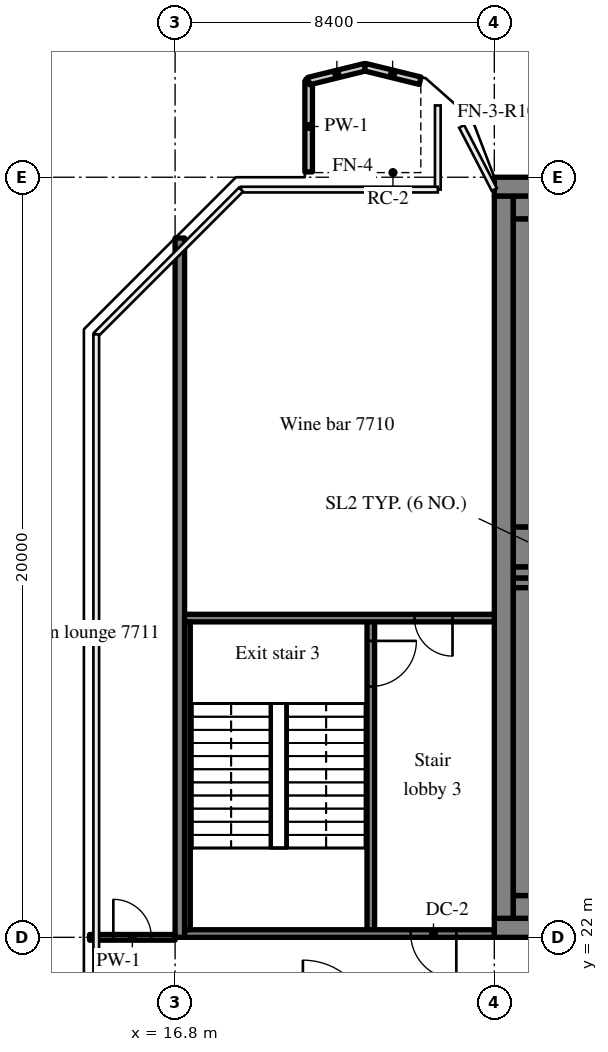
"""IFC4 building model, lengths in metres.
Left out: names, types, materials, properties, quantities, classifications, styles, units other than length and angle.
Written with IfcOpenShell. Run it as: python <this file> out.ifc"""

import sys

from ifc_helpers import new_model, si_unit, direction, frame, frame_2d, origin, place, context, subcontext, project, spatial, rectangle, extrude, source, transform, mapped, element, fill, save


model = new_model("IFC4")
c1 = context("Model", 3, precision=1e-05, world=origin(), true_north=direction((0.0, 1.0)))
c2 = subcontext(c1, "Body", "Model", "MODEL_VIEW")
j1 = project(units=[si_unit("LENGTHUNIT", "METRE"), si_unit("PLANEANGLEUNIT", "RADIAN")], contexts=[c1])
p1 = place(None, origin())
s1 = spatial("IfcSite", under=j1, at=p1, CompositionType="ELEMENT")
p2 = place(p1, origin())
s2 = spatial("IfcBuilding", under=s1, at=p2, CompositionType="ELEMENT")
p3 = place(p2, frame((0.0, 0.0, 323.7)))
s3 = spatial("IfcBuildingStorey", under=s2, at=p3, CompositionType="ELEMENT", Elevation=323.7)
m1 = source(origin(), c2, "Body", "SweptSolid", [
    extrude(rectangle(XDim=50.4, YDim=0.5, at=frame_2d((25.2, 0.0))), origin(), (0.0, 0.0, 1.0), 5.72),
])
p4 = place(p3, frame((25.2, 22.25, 0.0), z_axis=(0.0, 0.0, 1.0), x_axis=(1.0, 0.0, 0.0)))
e1 = element("IfcWall", 1, at=p4, inside=s3, PredefinedType="SHEAR", context=c2, shape_type="MappedRepresentation", body=[
    mapped(m1, transform((0.0, 0.0, 0.0), scale=1.0)),
])
m2 = source(origin(), c2, "Body", "SweptSolid", [
    extrude(rectangle(XDim=1.8, YDim=2.1, at=frame_2d((0.9, 1.05))), frame((0.0, 0.26, 0.0), z_axis=(0.0, -1.0, 0.0), x_axis=(1.0, 0.0, 0.0)), (0.0, 0.0, 1.0), 0.52),
])
p5 = place(p4, frame((15.9, 0.0, 0.0)))
e2 = element("IfcOpeningElement", 2, at=p5, cuts=e1, PredefinedType="OPENING", context=c2, shape_type="MappedRepresentation", body=[
    mapped(m2, transform((0.0, 0.0, 0.0), scale=1.0)),
])
m3 = source(origin(), c2, "Body", "SweptSolid", [
    extrude(rectangle(XDim=0.9, YDim=2.1, at=frame_2d((0.45, 1.05))), frame((0.0, 0.26, 0.0), z_axis=(0.0, -1.0, 0.0), x_axis=(1.0, 0.0, 0.0)), (0.0, 0.0, 1.0), 0.52),
])
p6 = place(p4, frame((9.675, 0.0, 0.0)))
e3 = element("IfcOpeningElement", 3, at=p6, cuts=e1, PredefinedType="OPENING", context=c2, shape_type="MappedRepresentation", body=[
    mapped(m3, transform((0.0, 0.0, 0.0), scale=1.0)),
])
p7 = place(p4, frame((21.525, 0.0, 0.0)))
e4 = element("IfcOpeningElement", 4, at=p7, cuts=e1, PredefinedType="OPENING", context=c2, shape_type="MappedRepresentation", body=[
    mapped(m3, transform((0.0, 0.0, 0.0), scale=1.0)),
])
p8 = place(p4, frame((32.7, 0.0, 0.0)))
e5 = element("IfcOpeningElement", 5, at=p8, cuts=e1, PredefinedType="OPENING", context=c2, shape_type="MappedRepresentation", body=[
    mapped(m2, transform((0.0, 0.0, 0.0), scale=1.0)),
])
m4 = source(origin(), c2, "Body", "SweptSolid", [
    extrude(rectangle(XDim=1.2, YDim=2.1, at=frame_2d((0.6, 1.05))), frame((0.0, 0.26, 0.0), z_axis=(0.0, -1.0, 0.0), x_axis=(1.0, 0.0, 0.0)), (0.0, 0.0, 1.0), 0.52),
])
p9 = place(p4, frame((6.5, 0.0, 0.0)))
e6 = element("IfcOpeningElement", 6, at=p9, cuts=e1, PredefinedType="OPENING", context=c2, shape_type="MappedRepresentation", body=[
    mapped(m4, transform((0.0, 0.0, 0.0), scale=1.0)),
])
p10 = place(p4, frame((47.975, 0.0, 0.0)))
e7 = element("IfcOpeningElement", 7, at=p10, cuts=e1, PredefinedType="OPENING", context=c2, shape_type="MappedRepresentation", body=[
    mapped(m4, transform((0.0, 0.0, 0.0), scale=1.0)),
])
p11 = place(p3, frame((25.2, 41.75, 0.0), z_axis=(0.0, 0.0, 1.0), x_axis=(1.0, 0.0, 0.0)))
e8 = element("IfcWall", 8, at=p11, inside=s3, PredefinedType="SHEAR", context=c2, shape_type="MappedRepresentation", body=[
    mapped(m1, transform((0.0, 0.0, 0.0), scale=1.0)),
])
m5 = source(origin(), c2, "Body", "SweptSolid", [
    extrude(rectangle(XDim=19.0, YDim=0.5, at=frame_2d((9.5, 0.0))), origin(), (0.0, 0.0, 1.0), 5.72),
])
p12 = place(p3, frame((25.45, 22.5, 0.0), z_axis=(0.0, 0.0, 1.0), x_axis=(0.0, 1.0, 0.0)))
e9 = element("IfcWall", 9, at=p12, inside=s3, PredefinedType="SHEAR", context=c2, shape_type="MappedRepresentation", body=[
    mapped(m5, transform((0.0, 0.0, 0.0), scale=1.0)),
])
m6 = source(origin(), c2, "Body", "SweptSolid", [
    extrude(rectangle(XDim=7.75, YDim=0.3, at=frame_2d((3.875, 0.0))), origin(), (0.0, 0.0, 1.0), 5.72),
])
p13 = place(p3, frame((25.7, 31.6, 0.0), z_axis=(0.0, 0.0, 1.0), x_axis=(1.0, 0.0, 0.0)))
e10 = element("IfcWall", 10, at=p13, inside=s3, PredefinedType="SHEAR", context=c2, shape_type="MappedRepresentation", body=[
    mapped(m6, transform((0.0, 0.0, 0.0), scale=1.0)),
])
m7 = source(origin(), c2, "Body", "SweptSolid", [
    extrude(rectangle(XDim=1.1, YDim=2.1, at=frame_2d((0.55, 1.05))), frame((0.0, 0.16, 0.0), z_axis=(0.0, -1.0, 0.0), x_axis=(1.0, 0.0, 0.0)), (0.0, 0.0, 1.0), 0.32),
])
p14 = place(p13, frame((6.05, 0.0, 0.0)))
e11 = element("IfcOpeningElement", 11, at=p14, cuts=e10, PredefinedType="OPENING", context=c2, shape_type="MappedRepresentation", body=[
    mapped(m7, transform((0.0, 0.0, 0.0), scale=1.0)),
])
m8 = source(origin(), c2, "Body", "SweptSolid", [
    extrude(rectangle(XDim=18.4, YDim=0.25, at=frame_2d((9.2, 0.0))), origin(), (0.0, 0.0, 1.0), 5.72),
])
p15 = place(p3, frame((16.925, 22.0, 0.0), z_axis=(0.0, 0.0, 1.0), x_axis=(0.0, 1.0, 0.0)))
e12 = element("IfcWall", 12, at=p15, inside=s3, PredefinedType="SHEAR", context=c2, shape_type="MappedRepresentation", body=[
    mapped(m8, transform((0.0, 0.0, 0.0), scale=1.0)),
])
m9 = source(origin(), c2, "Body", "SweptSolid", [
    extrude(rectangle(XDim=2.39, YDim=0.2, at=frame_2d((1.195, 0.0))), origin(), (0.0, 0.0, 1.0), 1.1),
])
p16 = place(p3, frame((20.314, 42.14, -0.05), z_axis=(0.0, 0.0, 1.0), x_axis=(0.0, 1.0, 0.0)))
e13 = element("IfcWall", 13, at=p16, inside=s3, PredefinedType="PARAPET", context=c2, shape_type="MappedRepresentation", body=[
    mapped(m9, transform((0.0, 0.0, 0.0), scale=1.0)),
])
m10 = source(origin(), c2, "Body", "SweptSolid", [
    extrude(rectangle(XDim=1.53, YDim=0.2, at=frame_2d((0.765, 0.0))), origin(), (0.0, 0.0, 1.0), 1.1),
])
p17 = place(p3, frame((20.314, 44.53, -0.05), z_axis=(0.0, 0.0, 1.0), x_axis=(0.971064415522, 0.238817714808, 0.0)))
e14 = element("IfcWall", 14, at=p17, inside=s3, PredefinedType="PARAPET", context=c2, shape_type="MappedRepresentation", body=[
    mapped(m10, transform((0.0, 0.0, 0.0), scale=1.0)),
])
m11 = source(origin(), c2, "Body", "SweptSolid", [
    extrude(rectangle(XDim=1.491, YDim=0.2, at=frame_2d((0.746, 0.0))), origin(), (0.0, 0.0, 1.0), 1.1),
])
p18 = place(p3, frame((21.8, 44.895, -0.05), z_axis=(0.0, 0.0, 1.0), x_axis=(0.971088495324, -0.238719781855, 0.0)))
e15 = element("IfcWall", 15, at=p18, inside=s3, PredefinedType="PARAPET", context=c2, shape_type="MappedRepresentation", body=[
    mapped(m11, transform((0.0, 0.0, 0.0), scale=1.0)),
])
m12 = source(origin(), c2, "Body", "SweptSolid", [
    extrude(rectangle(XDim=8.3, YDim=0.2, at=frame_2d((4.15, 0.0))), origin(), (0.0, 0.0, 1.0), 5.72),
])
p19 = place(p3, frame((21.95, 22.1, 0.0), z_axis=(0.0, 0.0, 1.0), x_axis=(0.0, 1.0, 0.0)))
e16 = element("IfcWall", 16, at=p19, inside=s3, PredefinedType="SOLIDWALL", context=c2, shape_type="MappedRepresentation", body=[
    mapped(m12, transform((0.0, 0.0, 0.0), scale=1.0)),
])
m13 = source(origin(), c2, "Body", "SweptSolid", [
    extrude(rectangle(XDim=1.2, YDim=2.1, at=frame_2d((0.6, 1.05))), frame((0.0, 0.11, 0.0), z_axis=(0.0, -1.0, 0.0), x_axis=(1.0, 0.0, 0.0)), (0.0, 0.0, 1.0), 0.22),
])
p20 = place(p19, frame((6.5, 0.0, 0.0)))
e17 = element("IfcOpeningElement", 17, at=p20, cuts=e16, PredefinedType="OPENING", context=c2, shape_type="MappedRepresentation", body=[
    mapped(m13, transform((0.0, 0.0, 0.0), scale=1.0)),
])
m14 = source(origin(), c2, "Body", "SweptSolid", [
    extrude(rectangle(XDim=8.15, YDim=0.2, at=frame_2d((4.075, 0.0))), origin(), (0.0, 0.0, 1.0), 5.72),
])
p21 = place(p3, frame((17.05, 22.1, 0.0), z_axis=(0.0, 0.0, 1.0), x_axis=(1.0, 0.0, 0.0)))
e18 = element("IfcWall", 18, at=p21, inside=s3, PredefinedType="SOLIDWALL", context=c2, shape_type="MappedRepresentation", body=[
    mapped(m14, transform((0.0, 0.0, 0.0), scale=1.0)),
])
p22 = place(p21, frame((5.95, 0.0, 0.0)))
e19 = element("IfcOpeningElement", 19, at=p22, cuts=e18, PredefinedType="OPENING", context=c2, shape_type="MappedRepresentation", body=[
    mapped(m13, transform((0.0, 0.0, 0.0), scale=1.0)),
])
p23 = place(p3, frame((17.05, 30.4, 0.0), z_axis=(0.0, 0.0, 1.0), x_axis=(1.0, 0.0, 0.0)))
e20 = element("IfcWall", 20, at=p23, inside=s3, PredefinedType="SOLIDWALL", context=c2, shape_type="MappedRepresentation", body=[
    mapped(m14, transform((0.0, 0.0, 0.0), scale=1.0)),
])
m15 = source(origin(), c2, "Body", "SweptSolid", [
    extrude(rectangle(XDim=1.0, YDim=2.1, at=frame_2d((0.5, 1.05))), frame((0.0, 0.11, 0.0), z_axis=(0.0, -1.0, 0.0), x_axis=(1.0, 0.0, 0.0)), (0.0, 0.0, 1.0), 0.22),
])
p24 = place(p23, frame((6.05, 0.0, 0.0)))
e21 = element("IfcOpeningElement", 21, at=p24, cuts=e20, PredefinedType="OPENING", context=c2, shape_type="MappedRepresentation", body=[
    mapped(m15, transform((0.0, 0.0, 0.0), scale=1.0)),
])
m16 = source(origin(), c2, "Body", "SweptSolid", [
    extrude(rectangle(XDim=5.25, YDim=0.6, at=frame_2d((2.625, 0.0))), origin(), (0.0, 0.0, 1.0), 5.72),
])
p25 = place(p3, frame((25.7, 22.8, 0.0), z_axis=(0.0, 0.0, 1.0), x_axis=(1.0, 0.0, 0.0)))
e22 = element("IfcWall", 22, at=p25, inside=s3, PredefinedType="SOLIDWALL", context=c2, shape_type="MappedRepresentation", body=[
    mapped(m16, transform((0.0, 0.0, 0.0), scale=1.0)),
])
m17 = source(origin(), c2, "Body", "SweptSolid", [
    extrude(rectangle(XDim=5.25, YDim=0.25, at=frame_2d((2.625, 0.0))), origin(), (0.0, 0.0, 1.0), 5.72),
])
p26 = place(p3, frame((25.7, 31.325, 0.0), z_axis=(0.0, 0.0, 1.0), x_axis=(1.0, 0.0, 0.0)))
e23 = element("IfcWall", 23, at=p26, inside=s3, PredefinedType="SOLIDWALL", context=c2, shape_type="MappedRepresentation", body=[
    mapped(m17, transform((0.0, 0.0, 0.0), scale=1.0)),
])
m18 = source(origin(), c2, "Body", "SweptSolid", [
    extrude(rectangle(XDim=8.1, YDim=0.6, at=frame_2d((4.05, 0.0))), origin(), (0.0, 0.0, 1.0), 5.72),
])
p27 = place(p3, frame((26.0, 23.1, 0.0), z_axis=(0.0, 0.0, 1.0), x_axis=(0.0, 1.0, 0.0)))
e24 = element("IfcWall", 24, at=p27, inside=s3, PredefinedType="SOLIDWALL", context=c2, shape_type="MappedRepresentation", body=[
    mapped(m18, transform((0.0, 0.0, 0.0), scale=1.0)),
])
m19 = source(origin(), c2, "Body", "SweptSolid", [
    extrude(rectangle(XDim=8.1, YDim=0.15, at=frame_2d((4.05, 0.0))), origin(), (0.0, 0.0, 1.0), 5.72),
])
p28 = place(p3, frame((17.125, 22.2, 0.0), z_axis=(0.0, 0.0, 1.0), x_axis=(0.0, 1.0, 0.0)))
e25 = element("IfcWall", 25, at=p28, inside=s3, PredefinedType="SOLIDWALL", context=c2, shape_type="MappedRepresentation", body=[
    mapped(m19, transform((0.0, 0.0, 0.0), scale=1.0)),
])
p29 = place(p3, frame((25.7, 41.2, 0.0), z_axis=(0.0, 0.0, 1.0), x_axis=(1.0, 0.0, 0.0)))
e26 = element("IfcWall", 26, at=p29, inside=s3, PredefinedType="SOLIDWALL", context=c2, shape_type="MappedRepresentation", body=[
    mapped(m16, transform((0.0, 0.0, 0.0), scale=1.0)),
])
m20 = source(origin(), c2, "Body", "SweptSolid", [
    extrude(rectangle(XDim=5.25, YDim=1.05, at=frame_2d((2.625, 0.0))), origin(), (0.0, 0.0, 1.0), 5.72),
])
p30 = place(p3, frame((25.7, 32.275, 0.0), z_axis=(0.0, 0.0, 1.0), x_axis=(1.0, 0.0, 0.0)))
e27 = element("IfcWall", 27, at=p30, inside=s3, PredefinedType="SOLIDWALL", context=c2, shape_type="MappedRepresentation", body=[
    mapped(m20, transform((0.0, 0.0, 0.0), scale=1.0)),
])
p31 = place(p3, frame((26.0, 32.8, 0.0), z_axis=(0.0, 0.0, 1.0), x_axis=(0.0, 1.0, 0.0)))
e28 = element("IfcWall", 28, at=p31, inside=s3, PredefinedType="SOLIDWALL", context=c2, shape_type="MappedRepresentation", body=[
    mapped(m18, transform((0.0, 0.0, 0.0), scale=1.0)),
])
m21 = source(origin(), c2, "Body", "SweptSolid", [
    extrude(rectangle(XDim=2.25, YDim=0.15, at=frame_2d((1.125, 0.0))), origin(), (0.0, 0.0, 1.0), 5.02),
])
p32 = place(p3, frame((14.55, 22.0, 0.0), z_axis=(0.0, 0.0, 1.0), x_axis=(1.0, 0.0, 0.0)))
e29 = element("IfcWall", 29, at=p32, inside=s3, PredefinedType="PARTITIONING", context=c2, shape_type="MappedRepresentation", body=[
    mapped(m21, transform((0.0, 0.0, 0.0), scale=1.0)),
])
m22 = source(origin(), c2, "Body", "SweptSolid", [
    extrude(rectangle(XDim=1.0, YDim=2.1, at=frame_2d((0.5, 1.05))), frame((0.0, 0.085, 0.0), z_axis=(0.0, -1.0, 0.0), x_axis=(1.0, 0.0, 0.0)), (0.0, 0.0, 1.0), 0.17),
])
p33 = place(p32, frame((0.625, 0.0, 0.0)))
e30 = element("IfcOpeningElement", 30, at=p33, cuts=e29, PredefinedType="OPENING", context=c2, shape_type="MappedRepresentation", body=[
    mapped(m22, transform((0.0, 0.0, 0.0), scale=1.0)),
])
m23 = source(origin(), c2, "Body", "SweptSolid", [
    extrude(rectangle(XDim=1.2, YDim=2.1, at=frame_2d((0.6, 1.05))), frame((0.0, 0.025, 0.0), z_axis=(0.0, -1.0, 0.0), x_axis=(1.0, 0.0, 0.0)), (0.0, 0.0, 1.0), 0.05),
])
p34 = place(p20, origin())
e31 = element("IfcDoor", 31, at=p34, inside=s3, OperationType="SINGLE_SWING_RIGHT", PredefinedType="DOOR", context=c2, shape_type="MappedRepresentation", body=[
    mapped(m23, transform((0.0, 0.0, 0.0), scale=1.0)),
])
fill(e17, e31)
p35 = place(p22, origin())
e32 = element("IfcDoor", 32, at=p35, inside=s3, OperationType="SINGLE_SWING_RIGHT", PredefinedType="DOOR", context=c2, shape_type="MappedRepresentation", body=[
    mapped(m23, transform((0.0, 0.0, 0.0), scale=1.0)),
])
fill(e19, e32)
m24 = source(origin(), c2, "Body", "SweptSolid", [
    extrude(rectangle(XDim=1.0, YDim=2.1, at=frame_2d((0.5, 1.05))), frame((0.0, 0.025, 0.0), z_axis=(0.0, -1.0, 0.0), x_axis=(1.0, 0.0, 0.0)), (0.0, 0.0, 1.0), 0.05),
])
p36 = place(p24, origin())
e33 = element("IfcDoor", 33, at=p36, inside=s3, OperationType="SINGLE_SWING_RIGHT", PredefinedType="DOOR", context=c2, shape_type="MappedRepresentation", body=[
    mapped(m24, transform((0.0, 0.0, 0.0), scale=1.0)),
])
fill(e21, e33)
p37 = place(p33, origin())
e34 = element("IfcDoor", 34, at=p37, inside=s3, OperationType="SINGLE_SWING_LEFT", PredefinedType="DOOR", context=c2, shape_type="MappedRepresentation", body=[
    mapped(m24, transform((0.0, 0.0, 0.0), scale=1.0)),
])
fill(e30, e34)
save(model, sys.argv[1])
